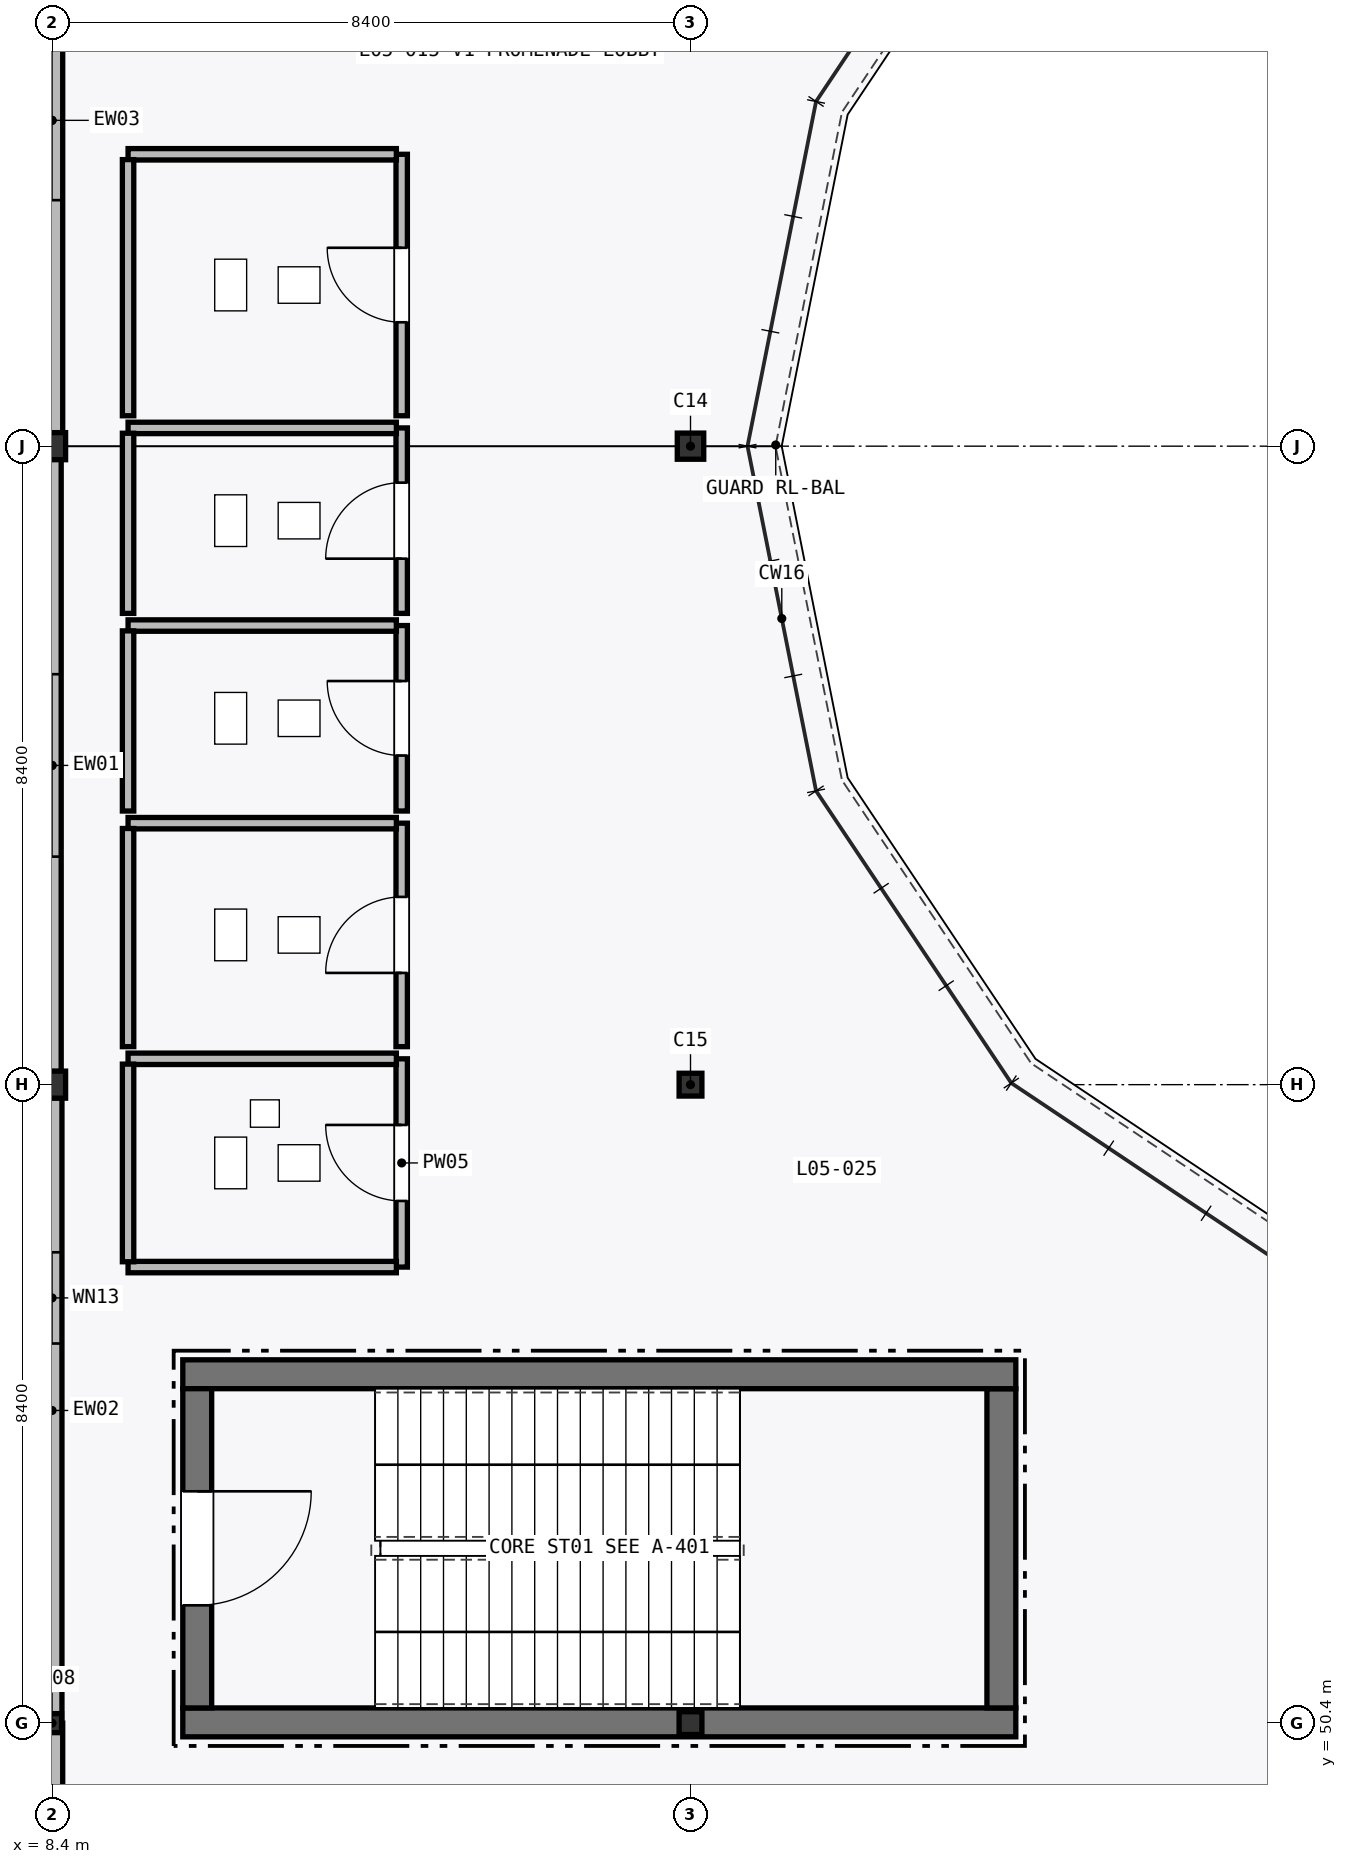
"""IFC4 building model, lengths in metres.
Left out: names, types, materials, properties, quantities, classifications, styles, units other than length and angle.
Written with IfcOpenShell. Run it as: python <this file> out.ifc"""

import sys

from ifc_helpers import new_model, si_unit, direction, frame, frame_2d, origin, origin_2d, place, context, subcontext, project, spatial, rectangle, hollow_circle, i_section, extrude, element, fill, save


model = new_model("IFC4")
c1 = context("Model", 3, precision=1e-05, world=origin(), true_north=direction((0.0, 1.0)))
c2 = subcontext(c1, "Body", "Model", "MODEL_VIEW")
j1 = project(units=[si_unit("LENGTHUNIT", "METRE"), si_unit("PLANEANGLEUNIT", "RADIAN")], contexts=[c1])
p1 = place(None, origin())
s1 = spatial("IfcSite", under=j1, at=p1, CompositionType="ELEMENT")
p2 = place(p1, origin())
s2 = spatial("IfcBuilding", under=s1, at=p2, CompositionType="ELEMENT")
p3 = place(p2, frame((0.0, 0.0, 21.6)))
s3 = spatial("IfcBuildingStorey", under=s2, at=p3, CompositionType="ELEMENT", Elevation=21.6)
p4 = place(p3, frame((8.4, 50.4, 0.0), z_axis=(0.0, 0.0, 1.0), x_axis=(1.0, 0.0, 0.0)))
e1 = element("IfcColumn", 1, at=p4, inside=s3, PredefinedType="COLUMN", context=c2, shape_type="SweptSolid", body=[
    extrude(i_section(OverallWidth=0.25, OverallDepth=0.25, WebThickness=0.009, FlangeThickness=0.014, FilletRadius=0.016, at=origin_2d()), origin(), (0.0, 0.0, 1.0), 5.1),
])
for number, where, z_axis, x_axis in (
    (2, (8.4, 58.8, 0.0), (0.0, 0.0, 1.0), (1.0, 0.0, 0.0)),
    (3, (8.4, 67.2, 0.0), (0.0, 0.0, 1.0), (1.0, 0.0, 0.0)),
):
    element("IfcColumn", number, at=place(p3, frame(where, z_axis=z_axis, x_axis=x_axis)), inside=s3, PredefinedType="COLUMN", context=c2, shape_type="SweptSolid", body=[
        extrude(hollow_circle(Radius=0.178, WallThickness=0.014, at=origin_2d()), origin(), (0.0, 0.0, 1.0), 5.1),
    ])
for number, where, z_axis, x_axis in (
    (4, (16.8, 50.4, 0.0), (0.0, 0.0, 1.0), (1.0, 0.0, 0.0)),
    (5, (16.8, 58.8, 0.0), (0.0, 0.0, 1.0), (1.0, 0.0, 0.0)),
):
    element("IfcColumn", number, at=place(p3, frame(where, z_axis=z_axis, x_axis=x_axis)), inside=s3, PredefinedType="COLUMN", context=c2, shape_type="SweptSolid", body=[
        extrude(i_section(OverallWidth=0.3, OverallDepth=0.3, WebThickness=0.01, FlangeThickness=0.015, FilletRadius=0.018, at=origin_2d()), origin(), (0.0, 0.0, 1.0), 5.1),
    ])
p5 = place(p3, frame((16.8, 67.2, 0.0), z_axis=(0.0, 0.0, 1.0), x_axis=(1.0, 0.0, 0.0)))
e6 = element("IfcColumn", 6, at=p5, inside=s3, PredefinedType="COLUMN", context=c2, shape_type="SweptSolid", body=[
    extrude(i_section(OverallWidth=0.348, OverallDepth=0.344, WebThickness=0.01, FlangeThickness=0.016, FilletRadius=0.02, at=origin_2d()), origin(), (0.0, 0.0, 1.0), 5.1),
])
p6 = place(p3, frame((8.4, 75.6, 0.0), z_axis=(0.0, 0.0, 1.0), x_axis=(0.0, -1.0, 0.0)))
e7 = element("IfcWall", 7, at=p6, inside=s3, PredefinedType="STANDARD", context=c2, shape_type="SweptSolid", body=[
    extrude(rectangle(XDim=8.227, YDim=0.28, at=frame_2d((4.114, 0.0))), origin(), (0.0, 0.0, 1.0), 4.397),
])
p7 = place(p6, frame((3.063, 0.0, 0.95)))
e8 = element("IfcOpeningElement", 8, at=p7, cuts=e7, PredefinedType="OPENING", context=c2, shape_type="SweptSolid", body=[
    extrude(rectangle(XDim=2.1, YDim=2.1, at=frame_2d((1.05, 1.05))), frame((0.0, 0.15, 0.0), z_axis=(0.0, -1.0, 0.0), x_axis=(1.0, 0.0, 0.0)), (0.0, 0.0, 1.0), 0.3),
])
p8 = place(p3, frame((8.4, 67.027, 0.0), z_axis=(0.0, 0.0, 1.0), x_axis=(0.0, -1.0, 0.0)))
e9 = element("IfcWall", 9, at=p8, inside=s3, PredefinedType="STANDARD", context=c2, shape_type="SweptSolid", body=[
    extrude(rectangle(XDim=8.054, YDim=0.24, at=frame_2d((4.027, 0.0))), origin(), (0.0, 0.0, 1.0), 4.397),
])
p9 = place(p8, frame((2.827, 0.0, 0.95)))
e10 = element("IfcOpeningElement", 10, at=p9, cuts=e9, PredefinedType="OPENING", context=c2, shape_type="SweptSolid", body=[
    extrude(rectangle(XDim=2.4, YDim=2.1, at=frame_2d((1.2, 1.05))), frame((0.0, 0.13, 0.0), z_axis=(0.0, -1.0, 0.0), x_axis=(1.0, 0.0, 0.0)), (0.0, 0.0, 1.0), 0.26),
])
p10 = place(p3, frame((8.4, 58.627, 0.0), z_axis=(0.0, 0.0, 1.0), x_axis=(0.0, -1.0, 0.0)))
e11 = element("IfcWall", 11, at=p10, inside=s3, PredefinedType="STANDARD", context=c2, shape_type="SweptSolid", body=[
    extrude(rectangle(XDim=8.227, YDim=0.26, at=frame_2d((4.114, 0.0))), origin(), (0.0, 0.0, 1.0), 4.397),
])
p11 = place(p10, frame((2.033, 0.0, 0.95)))
e12 = element("IfcOpeningElement", 12, at=p11, cuts=e11, PredefinedType="OPENING", context=c2, shape_type="SweptSolid", body=[
    extrude(rectangle(XDim=1.2, YDim=2.4, at=frame_2d((0.6, 1.2))), frame((0.0, 0.14, 0.0), z_axis=(0.0, -1.0, 0.0), x_axis=(1.0, 0.0, 0.0)), (0.0, 0.0, 1.0), 0.28),
])
p12 = place(p3, frame((8.4, 50.4, 0.0), z_axis=(0.0, 0.0, 1.0), x_axis=(0.0, -1.0, 0.0)))
e13 = element("IfcWall", 13, at=p12, inside=s3, PredefinedType="STANDARD", context=c2, shape_type="SweptSolid", body=[
    extrude(rectangle(XDim=8.227, YDim=0.28, at=frame_2d((4.113, 0.0))), origin(), (0.0, 0.0, 1.0), 4.397),
])
p13 = place(p12, frame((3.364, 0.0, 0.95)))
e14 = element("IfcOpeningElement", 14, at=p13, cuts=e13, PredefinedType="OPENING", context=c2, shape_type="SweptSolid", body=[
    extrude(rectangle(XDim=1.5, YDim=2.4, at=frame_2d((0.75, 1.2))), frame((0.0, 0.15, 0.0), z_axis=(0.0, -1.0, 0.0), x_axis=(1.0, 0.0, 0.0)), (0.0, 0.0, 1.0), 0.3),
])
p14 = place(p3, frame((10.12, 50.41, 0.0), z_axis=(0.0, 0.0, 1.0), x_axis=(1.0, 0.0, 0.0)))
e15 = element("IfcWall", 15, at=p14, inside=s3, PredefinedType="SHEAR", context=c2, shape_type="SweptSolid", body=[
    extrude(rectangle(XDim=10.96, YDim=0.38, at=frame_2d((5.48, 0.0))), origin(), (0.0, 0.0, 1.0), 4.845),
])
p15 = place(p3, frame((20.89, 50.6, 0.0), z_axis=(0.0, 0.0, 1.0), x_axis=(0.0, 1.0, 0.0)))
e16 = element("IfcWall", 16, at=p15, inside=s3, PredefinedType="SHEAR", context=c2, shape_type="SweptSolid", body=[
    extrude(rectangle(XDim=4.2, YDim=0.38, at=frame_2d((2.1, 0.0))), origin(), (0.0, 0.0, 1.0), 4.845),
])
p16 = place(p3, frame((21.08, 54.99, 0.0), z_axis=(0.0, 0.0, 1.0), x_axis=(-1.0, 0.0, 0.0)))
e17 = element("IfcWall", 17, at=p16, inside=s3, PredefinedType="SHEAR", context=c2, shape_type="SweptSolid", body=[
    extrude(rectangle(XDim=10.96, YDim=0.38, at=frame_2d((5.48, 0.0))), origin(), (0.0, 0.0, 1.0), 4.845),
])
p17 = place(p3, frame((10.31, 54.8, 0.0), z_axis=(0.0, 0.0, 1.0), x_axis=(0.0, -1.0, 0.0)))
e18 = element("IfcWall", 18, at=p17, inside=s3, PredefinedType="SHEAR", context=c2, shape_type="SweptSolid", body=[
    extrude(rectangle(XDim=4.2, YDim=0.38, at=frame_2d((2.1, 0.0))), origin(), (0.0, 0.0, 1.0), 4.845),
])
p18 = place(p17, frame((1.35, 0.0, 0.0)))
e19 = element("IfcOpeningElement", 19, at=p18, cuts=e18, PredefinedType="OPENING", context=c2, shape_type="SweptSolid", body=[
    extrude(rectangle(XDim=1.5, YDim=2.15, at=frame_2d((0.75, 1.075))), frame((0.0, 0.2, 0.0), z_axis=(0.0, -1.0, 0.0), x_axis=(1.0, 0.0, 0.0)), (0.0, 0.0, 1.0), 0.4),
])
p19 = place(p3, frame((13.0, 56.4, 0.0), z_axis=(0.0, 0.0, 1.0), x_axis=(0.0, 1.0, 0.0)))
e20 = element("IfcWall", 20, at=p19, inside=s3, PredefinedType="PARTITIONING", context=c2, shape_type="SweptSolid", body=[
    extrude(rectangle(XDim=2.74, YDim=0.15, at=frame_2d((1.37, 0.0))), origin(), (0.0, 0.0, 1.0), 4.845),
])
p20 = place(p19, frame((0.87, 0.0, 0.0)))
e21 = element("IfcOpeningElement", 21, at=p20, cuts=e20, PredefinedType="OPENING", context=c2, shape_type="SweptSolid", body=[
    extrude(rectangle(XDim=1.0, YDim=2.1, at=frame_2d((0.5, 1.05))), frame((0.0, 0.085, 0.0), z_axis=(0.0, -1.0, 0.0), x_axis=(1.0, 0.0, 0.0)), (0.0, 0.0, 1.0), 0.17),
])
p21 = place(p3, frame((9.4, 56.4, 0.0), z_axis=(0.0, 0.0, 1.0), x_axis=(1.0, 0.0, 0.0)))
e22 = element("IfcWall", 22, at=p21, inside=s3, PredefinedType="PARTITIONING", context=c2, shape_type="SweptSolid", body=[
    extrude(rectangle(XDim=3.53, YDim=0.15, at=frame_2d((1.765, 0.0))), origin(), (0.0, 0.0, 1.0), 4.845),
])
p22 = place(p3, frame((12.93, 59.14, 0.0), z_axis=(0.0, 0.0, 1.0), x_axis=(-1.0, 0.0, 0.0)))
e23 = element("IfcWall", 23, at=p22, inside=s3, PredefinedType="PARTITIONING", context=c2, shape_type="SweptSolid", body=[
    extrude(rectangle(XDim=3.53, YDim=0.15, at=frame_2d((1.765, 0.0))), origin(), (0.0, 0.0, 1.0), 4.037),
])
p23 = place(p3, frame((9.4, 59.07, 0.0), z_axis=(0.0, 0.0, 1.0), x_axis=(0.0, -1.0, 0.0)))
e24 = element("IfcWall", 24, at=p23, inside=s3, PredefinedType="PARTITIONING", context=c2, shape_type="SweptSolid", body=[
    extrude(rectangle(XDim=2.6, YDim=0.15, at=frame_2d((1.3, 0.0))), origin(), (0.0, 0.0, 1.0), 4.845),
])
p24 = place(p3, frame((13.0, 59.3, 0.0), z_axis=(0.0, 0.0, 1.0), x_axis=(0.0, 1.0, 0.0)))
e25 = element("IfcWall", 25, at=p24, inside=s3, PredefinedType="PARTITIONING", context=c2, shape_type="SweptSolid", body=[
    extrude(rectangle(XDim=2.94, YDim=0.15, at=frame_2d((1.47, 0.0))), origin(), (0.0, 0.0, 1.0), 4.845),
])
p25 = place(p24, frame((0.97, 0.0, 0.0)))
e26 = element("IfcOpeningElement", 26, at=p25, cuts=e25, PredefinedType="OPENING", context=c2, shape_type="SweptSolid", body=[
    extrude(rectangle(XDim=1.0, YDim=2.1, at=frame_2d((0.5, 1.05))), frame((0.0, 0.085, 0.0), z_axis=(0.0, -1.0, 0.0), x_axis=(1.0, 0.0, 0.0)), (0.0, 0.0, 1.0), 0.17),
])
p26 = place(p3, frame((12.93, 62.24, 0.0), z_axis=(0.0, 0.0, 1.0), x_axis=(-1.0, 0.0, 0.0)))
e27 = element("IfcWall", 27, at=p26, inside=s3, PredefinedType="PARTITIONING", context=c2, shape_type="SweptSolid", body=[
    extrude(rectangle(XDim=3.53, YDim=0.15, at=frame_2d((1.765, 0.0))), origin(), (0.0, 0.0, 1.0), 4.845),
])
p27 = place(p3, frame((9.4, 62.17, 0.0), z_axis=(0.0, 0.0, 1.0), x_axis=(0.0, -1.0, 0.0)))
e28 = element("IfcWall", 28, at=p27, inside=s3, PredefinedType="PARTITIONING", context=c2, shape_type="SweptSolid", body=[
    extrude(rectangle(XDim=2.87, YDim=0.15, at=frame_2d((1.435, 0.0))), origin(), (0.0, 0.0, 1.0), 4.845),
])
p28 = place(p3, frame((13.0, 62.4, 0.0), z_axis=(0.0, 0.0, 1.0), x_axis=(0.0, 1.0, 0.0)))
e29 = element("IfcWall", 29, at=p28, inside=s3, PredefinedType="PARTITIONING", context=c2, shape_type="SweptSolid", body=[
    extrude(rectangle(XDim=2.44, YDim=0.15, at=frame_2d((1.22, 0.0))), origin(), (0.0, 0.0, 1.0), 4.845),
])
p29 = place(p28, frame((0.73, 0.0, 0.0)))
e30 = element("IfcOpeningElement", 30, at=p29, cuts=e29, PredefinedType="OPENING", context=c2, shape_type="SweptSolid", body=[
    extrude(rectangle(XDim=0.98, YDim=2.1, at=frame_2d((0.49, 1.05))), frame((0.0, 0.085, 0.0), z_axis=(0.0, -1.0, 0.0), x_axis=(1.0, 0.0, 0.0)), (0.0, 0.0, 1.0), 0.17),
])
p30 = place(p3, frame((12.93, 64.84, 0.0), z_axis=(0.0, 0.0, 1.0), x_axis=(-1.0, 0.0, 0.0)))
e31 = element("IfcWall", 31, at=p30, inside=s3, PredefinedType="PARTITIONING", context=c2, shape_type="SweptSolid", body=[
    extrude(rectangle(XDim=3.53, YDim=0.15, at=frame_2d((1.765, 0.0))), origin(), (0.0, 0.0, 1.0), 4.845),
])
p31 = place(p3, frame((9.4, 64.77, 0.0), z_axis=(0.0, 0.0, 1.0), x_axis=(0.0, -1.0, 0.0)))
e32 = element("IfcWall", 32, at=p31, inside=s3, PredefinedType="PARTITIONING", context=c2, shape_type="SweptSolid", body=[
    extrude(rectangle(XDim=2.37, YDim=0.15, at=frame_2d((1.185, 0.0))), origin(), (0.0, 0.0, 1.0), 4.845),
])
p32 = place(p3, frame((13.0, 65.0, 0.0), z_axis=(0.0, 0.0, 1.0), x_axis=(0.0, 1.0, 0.0)))
e33 = element("IfcWall", 33, at=p32, inside=s3, PredefinedType="PARTITIONING", context=c2, shape_type="SweptSolid", body=[
    extrude(rectangle(XDim=2.44, YDim=0.15, at=frame_2d((1.22, 0.0))), origin(), (0.0, 0.0, 1.0), 4.845),
])
p33 = place(p32, frame((0.72, 0.0, 0.0)))
e34 = element("IfcOpeningElement", 34, at=p33, cuts=e33, PredefinedType="OPENING", context=c2, shape_type="SweptSolid", body=[
    extrude(rectangle(XDim=1.0, YDim=2.1, at=frame_2d((0.5, 1.05))), frame((0.0, 0.085, 0.0), z_axis=(0.0, -1.0, 0.0), x_axis=(1.0, 0.0, 0.0)), (0.0, 0.0, 1.0), 0.17),
])
p34 = place(p3, frame((12.93, 67.44, 0.0), z_axis=(0.0, 0.0, 1.0), x_axis=(-1.0, 0.0, 0.0)))
e35 = element("IfcWall", 35, at=p34, inside=s3, PredefinedType="PARTITIONING", context=c2, shape_type="SweptSolid", body=[
    extrude(rectangle(XDim=3.53, YDim=0.15, at=frame_2d((1.765, 0.0))), origin(), (0.0, 0.0, 1.0), 4.237),
])
p35 = place(p3, frame((9.4, 67.37, 0.0), z_axis=(0.0, 0.0, 1.0), x_axis=(0.0, -1.0, 0.0)))
e36 = element("IfcWall", 36, at=p35, inside=s3, PredefinedType="PARTITIONING", context=c2, shape_type="SweptSolid", body=[
    extrude(rectangle(XDim=2.37, YDim=0.15, at=frame_2d((1.185, 0.0))), origin(), (0.0, 0.0, 1.0), 4.845),
])
p36 = place(p3, frame((13.0, 67.6, 0.0), z_axis=(0.0, 0.0, 1.0), x_axis=(0.0, 1.0, 0.0)))
e37 = element("IfcWall", 37, at=p36, inside=s3, PredefinedType="PARTITIONING", context=c2, shape_type="SweptSolid", body=[
    extrude(rectangle(XDim=3.44, YDim=0.15, at=frame_2d((1.72, 0.0))), origin(), (0.0, 0.0, 1.0), 4.845),
])
p37 = place(p36, frame((1.23, 0.0, 0.0)))
e38 = element("IfcOpeningElement", 38, at=p37, cuts=e37, PredefinedType="OPENING", context=c2, shape_type="SweptSolid", body=[
    extrude(rectangle(XDim=0.98, YDim=2.1, at=frame_2d((0.49, 1.05))), frame((0.0, 0.085, 0.0), z_axis=(0.0, -1.0, 0.0), x_axis=(1.0, 0.0, 0.0)), (0.0, 0.0, 1.0), 0.17),
])
p38 = place(p3, frame((12.93, 71.04, 0.0), z_axis=(0.0, 0.0, 1.0), x_axis=(-1.0, 0.0, 0.0)))
e39 = element("IfcWall", 39, at=p38, inside=s3, PredefinedType="PARTITIONING", context=c2, shape_type="SweptSolid", body=[
    extrude(rectangle(XDim=3.53, YDim=0.15, at=frame_2d((1.765, 0.0))), origin(), (0.0, 0.0, 1.0), 4.845),
])
p39 = place(p3, frame((9.4, 70.97, 0.0), z_axis=(0.0, 0.0, 1.0), x_axis=(0.0, -1.0, 0.0)))
e40 = element("IfcWall", 40, at=p39, inside=s3, PredefinedType="PARTITIONING", context=c2, shape_type="SweptSolid", body=[
    extrude(rectangle(XDim=3.37, YDim=0.15, at=frame_2d((1.685, 0.0))), origin(), (0.0, 0.0, 1.0), 4.845),
])
p40 = place(p7, origin())
e41 = element("IfcWindow", 41, at=p40, inside=s3, PartitioningType="SINGLE_PANEL", PredefinedType="WINDOW", context=c2, shape_type="SweptSolid", body=[
    extrude(rectangle(XDim=2.1, YDim=2.1, at=frame_2d((1.05, 1.05))), frame((0.0, 0.03, 0.0), z_axis=(0.0, -1.0, 0.0), x_axis=(1.0, 0.0, 0.0)), (0.0, 0.0, 1.0), 0.06),
])
fill(e8, e41)
p41 = place(p9, origin())
e42 = element("IfcWindow", 42, at=p41, inside=s3, PartitioningType="SINGLE_PANEL", PredefinedType="WINDOW", context=c2, shape_type="SweptSolid", body=[
    extrude(rectangle(XDim=2.4, YDim=2.1, at=frame_2d((1.2, 1.05))), frame((0.0, 0.03, 0.0), z_axis=(0.0, -1.0, 0.0), x_axis=(1.0, 0.0, 0.0)), (0.0, 0.0, 1.0), 0.06),
])
fill(e10, e42)
p42 = place(p11, origin())
e43 = element("IfcWindow", 43, at=p42, inside=s3, PartitioningType="SINGLE_PANEL", PredefinedType="WINDOW", context=c2, shape_type="SweptSolid", body=[
    extrude(rectangle(XDim=1.2, YDim=2.4, at=frame_2d((0.6, 1.2))), frame((0.0, 0.03, 0.0), z_axis=(0.0, -1.0, 0.0), x_axis=(1.0, 0.0, 0.0)), (0.0, 0.0, 1.0), 0.06),
])
fill(e12, e43)
p43 = place(p18, origin())
e44 = element("IfcDoor", 44, at=p43, inside=s3, OperationType="SINGLE_SWING_LEFT", PredefinedType="DOOR", context=c2, shape_type="SweptSolid", body=[
    extrude(rectangle(XDim=1.5, YDim=2.15, at=frame_2d((0.75, 1.075))), frame((0.0, 0.025, 0.0), z_axis=(0.0, -1.0, 0.0), x_axis=(1.0, 0.0, 0.0)), (0.0, 0.0, 1.0), 0.05),
])
fill(e19, e44)
p44 = place(p20, origin())
e45 = element("IfcDoor", 45, at=p44, inside=s3, OperationType="SINGLE_SWING_RIGHT", PredefinedType="DOOR", context=c2, shape_type="SweptSolid", body=[
    extrude(rectangle(XDim=1.0, YDim=2.1, at=frame_2d((0.5, 1.05))), frame((0.0, 0.025, 0.0), z_axis=(0.0, -1.0, 0.0), x_axis=(1.0, 0.0, 0.0)), (0.0, 0.0, 1.0), 0.05),
])
fill(e21, e45)
p45 = place(p25, origin())
e46 = element("IfcDoor", 46, at=p45, inside=s3, OperationType="SINGLE_SWING_LEFT", PredefinedType="DOOR", context=c2, shape_type="SweptSolid", body=[
    extrude(rectangle(XDim=1.0, YDim=2.1, at=frame_2d((0.5, 1.05))), frame((0.0, 0.025, 0.0), z_axis=(0.0, -1.0, 0.0), x_axis=(1.0, 0.0, 0.0)), (0.0, 0.0, 1.0), 0.05),
])
fill(e26, e46)
p46 = place(p29, origin())
e47 = element("IfcDoor", 47, at=p46, inside=s3, OperationType="SINGLE_SWING_RIGHT", PredefinedType="DOOR", context=c2, shape_type="SweptSolid", body=[
    extrude(rectangle(XDim=0.98, YDim=2.1, at=frame_2d((0.49, 1.05))), frame((0.0, 0.025, 0.0), z_axis=(0.0, -1.0, 0.0), x_axis=(1.0, 0.0, 0.0)), (0.0, 0.0, 1.0), 0.05),
])
fill(e30, e47)
p47 = place(p33, origin())
e48 = element("IfcDoor", 48, at=p47, inside=s3, OperationType="SINGLE_SWING_LEFT", PredefinedType="DOOR", context=c2, shape_type="SweptSolid", body=[
    extrude(rectangle(XDim=1.0, YDim=2.1, at=frame_2d((0.5, 1.05))), frame((0.0, 0.025, 0.0), z_axis=(0.0, -1.0, 0.0), x_axis=(1.0, 0.0, 0.0)), (0.0, 0.0, 1.0), 0.05),
])
fill(e34, e48)
p48 = place(p37, origin())
e49 = element("IfcDoor", 49, at=p48, inside=s3, OperationType="SINGLE_SWING_RIGHT", PredefinedType="DOOR", context=c2, shape_type="SweptSolid", body=[
    extrude(rectangle(XDim=0.98, YDim=2.1, at=frame_2d((0.49, 1.05))), frame((0.0, 0.025, 0.0), z_axis=(0.0, -1.0, 0.0), x_axis=(1.0, 0.0, 0.0)), (0.0, 0.0, 1.0), 0.05),
])
fill(e38, e49)
save(model, sys.argv[1])
